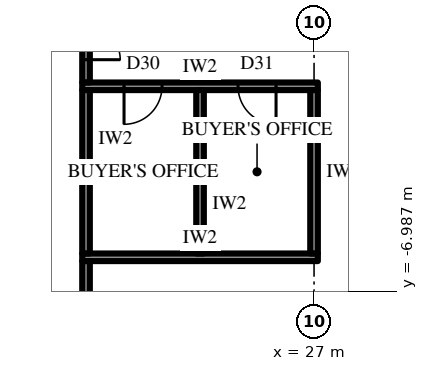
"""IFC4 building model, lengths in metres.
Left out: names, types, materials, properties, quantities, classifications, styles, units other than length and angle.
Written with IfcOpenShell. Run it as: python <this file> out.ifc"""

import sys

from ifc_helpers import new_model, si_unit, direction, frame, frame_2d, origin, place, context, subcontext, project, spatial, rectangle, extrude, element, fill, save


model = new_model("IFC4")
c1 = context("Model", 3, precision=1e-05, world=origin(), true_north=direction((0.0, 1.0)))
c2 = subcontext(c1, "Body", "Model", "MODEL_VIEW")
j1 = project(units=[si_unit("LENGTHUNIT", "METRE"), si_unit("PLANEANGLEUNIT", "RADIAN")], contexts=[c1])
p1 = place(None, origin())
s1 = spatial("IfcSite", under=j1, at=p1, CompositionType="ELEMENT")
p2 = place(p1, origin())
s2 = spatial("IfcBuilding", under=s1, at=p2, CompositionType="ELEMENT")
p3 = place(p2, frame((0.0, 0.0, 65.5)))
s3 = spatial("IfcBuildingStorey", under=s2, at=p3, CompositionType="ELEMENT", Elevation=65.5)
p4 = place(p3, frame((21.232, -30.925, 0.0), z_axis=(0.0, 0.0, 1.0), x_axis=(0.499999163675, 0.866025886636, 0.0)))
e1 = element("IfcWall", 1, at=p4, inside=s3, PredefinedType="SOLIDWALL", context=c2, shape_type="SweptSolid", body=[
    extrude(rectangle(XDim=32.332, YDim=0.3, at=frame_2d((16.166, 0.0))), origin(), (0.0, 0.0, 1.0), 2.7),
])
p5 = place(p4, frame((1.319, 0.0, 0.6)))
e2 = element("IfcOpeningElement", 2, at=p5, cuts=e1, PredefinedType="OPENING", context=c2, shape_type="SweptSolid", body=[
    extrude(rectangle(XDim=2.75, YDim=1.85, at=frame_2d((1.375, 0.925))), frame((0.0, 0.16, 0.0), z_axis=(0.0, -1.0, 0.0), x_axis=(1.0, 0.0, 0.0)), (0.0, 0.0, 1.0), 0.32),
])
p6 = place(p4, frame((6.708, 0.0, 0.6)))
e3 = element("IfcOpeningElement", 3, at=p6, cuts=e1, PredefinedType="OPENING", context=c2, shape_type="SweptSolid", body=[
    extrude(rectangle(XDim=2.75, YDim=1.85, at=frame_2d((1.375, 0.925))), frame((0.0, 0.16, 0.0), z_axis=(0.0, -1.0, 0.0), x_axis=(1.0, 0.0, 0.0)), (0.0, 0.0, 1.0), 0.32),
])
p7 = place(p4, frame((12.872, 0.0, 0.0)))
e4 = element("IfcOpeningElement", 4, at=p7, cuts=e1, PredefinedType="OPENING", context=c2, shape_type="SweptSolid", body=[
    extrude(rectangle(XDim=1.2, YDim=2.4, at=frame_2d((0.6, 1.2))), frame((0.0, 0.16, 0.0), z_axis=(0.0, -1.0, 0.0), x_axis=(1.0, 0.0, 0.0)), (0.0, 0.0, 1.0), 0.32),
])
p8 = place(p4, frame((17.485, 0.0, 0.6)))
e5 = element("IfcOpeningElement", 5, at=p8, cuts=e1, PredefinedType="OPENING", context=c2, shape_type="SweptSolid", body=[
    extrude(rectangle(XDim=2.75, YDim=1.85, at=frame_2d((1.375, 0.925))), frame((0.0, 0.16, 0.0), z_axis=(0.0, -1.0, 0.0), x_axis=(1.0, 0.0, 0.0)), (0.0, 0.0, 1.0), 0.32),
])
p9 = place(p4, frame((22.874, 0.0, 0.6)))
e6 = element("IfcOpeningElement", 6, at=p9, cuts=e1, PredefinedType="OPENING", context=c2, shape_type="SweptSolid", body=[
    extrude(rectangle(XDim=2.75, YDim=1.85, at=frame_2d((1.375, 0.925))), frame((0.0, 0.16, 0.0), z_axis=(0.0, -1.0, 0.0), x_axis=(1.0, 0.0, 0.0)), (0.0, 0.0, 1.0), 0.32),
])
p10 = place(p4, frame((28.262, 0.0, 0.6)))
e7 = element("IfcOpeningElement", 7, at=p10, cuts=e1, PredefinedType="OPENING", context=c2, shape_type="SweptSolid", body=[
    extrude(rectangle(XDim=2.75, YDim=1.85, at=frame_2d((1.375, 0.925))), frame((0.0, 0.16, 0.0), z_axis=(0.0, -1.0, 0.0), x_axis=(1.0, 0.0, 0.0)), (0.0, 0.0, 1.0), 0.32),
])
p11 = place(p3, frame((20.9, -1.6, 0.0), z_axis=(0.0, 0.0, 1.0), x_axis=(1.0, 0.0, 0.0)))
e8 = element("IfcWall", 8, at=p11, inside=s3, PredefinedType="PARTITIONING", context=c2, shape_type="SweptSolid", body=[
    extrude(rectangle(XDim=6.2, YDim=0.2, at=frame_2d((3.1, 0.0))), origin(), (0.0, 0.0, 1.0), 4.0),
])
p12 = place(p11, frame((1.1, 0.0, 0.0)))
e9 = element("IfcOpeningElement", 9, at=p12, cuts=e8, PredefinedType="OPENING", context=c2, shape_type="SweptSolid", body=[
    extrude(rectangle(XDim=1.0, YDim=2.2, at=frame_2d((0.5, 1.1))), frame((0.0, 0.11, 0.0), z_axis=(0.0, -1.0, 0.0), x_axis=(1.0, 0.0, 0.0)), (0.0, 0.0, 1.0), 0.22),
])
p13 = place(p11, frame((4.1, 0.0, 0.0)))
e10 = element("IfcOpeningElement", 10, at=p13, cuts=e8, PredefinedType="OPENING", context=c2, shape_type="SweptSolid", body=[
    extrude(rectangle(XDim=1.0, YDim=2.2, at=frame_2d((0.5, 1.1))), frame((0.0, 0.11, 0.0), z_axis=(0.0, -1.0, 0.0), x_axis=(1.0, 0.0, 0.0)), (0.0, 0.0, 1.0), 0.22),
])
p14 = place(p3, frame((20.9, -6.1, 0.0), z_axis=(0.0, 0.0, 1.0), x_axis=(1.0, 0.0, 0.0)))
e11 = element("IfcWall", 11, at=p14, inside=s3, PredefinedType="PARTITIONING", context=c2, shape_type="SweptSolid", body=[
    extrude(rectangle(XDim=6.2, YDim=0.2, at=frame_2d((3.1, 0.0))), origin(), (0.0, 0.0, 1.0), 4.0),
])
for number, where, z_axis, x_axis in (
    (12, (21.0, -1.7, 0.0), (0.0, 0.0, 1.0), (0.0, -1.0, 0.0)),
    (13, (24.0, -1.7, 0.0), (0.0, 0.0, 1.0), (0.0, -1.0, 0.0)),
    (14, (27.0, -1.7, 0.0), (0.0, 0.0, 1.0), (0.0, -1.0, 0.0)),
):
    element("IfcWall", number, at=place(p3, frame(where, z_axis=z_axis, x_axis=x_axis)), inside=s3, PredefinedType="PARTITIONING", context=c2, shape_type="SweptSolid", body=[
        extrude(rectangle(XDim=4.3, YDim=0.2, at=frame_2d((2.15, 0.0))), origin(), (0.0, 0.0, 1.0), 4.0),
    ])
p15 = place(p3, frame((21.0, -6.201, 0.0), z_axis=(0.0, 0.0, 1.0), x_axis=(0.0, -1.0, 0.0)))
e15 = element("IfcWall", 15, at=p15, inside=s3, PredefinedType="PARTITIONING", context=c2, shape_type="SweptSolid", body=[
    extrude(rectangle(XDim=6.499, YDim=0.2, at=frame_2d((3.25, 0.0))), origin(), (0.0, 0.0, 1.0), 4.0),
])
p16 = place(p3, frame((21.0, 1.499, 0.0), z_axis=(0.0, 0.0, 1.0), x_axis=(0.0, -1.0, 0.0)))
e16 = element("IfcWall", 16, at=p16, inside=s3, PredefinedType="PARTITIONING", context=c2, shape_type="SweptSolid", body=[
    extrude(rectangle(XDim=2.998, YDim=0.2, at=frame_2d((1.499, 0.0))), origin(), (0.0, 0.0, 1.0), 4.0),
])
p17 = place(p16, frame((0.599, 0.0, 0.0)))
e17 = element("IfcOpeningElement", 17, at=p17, cuts=e16, PredefinedType="OPENING", context=c2, shape_type="SweptSolid", body=[
    extrude(rectangle(XDim=1.8, YDim=2.4, at=frame_2d((0.9, 1.2))), frame((0.0, 0.11, 0.0), z_axis=(0.0, -1.0, 0.0), x_axis=(1.0, 0.0, 0.0)), (0.0, 0.0, 1.0), 0.22),
])
p18 = place(p12, frame((1.0, 0.0, 0.0), z_axis=(0.0, 0.0, 1.0), x_axis=(-1.0, 0.0, 0.0)))
e18 = element("IfcDoor", 18, at=p18, inside=s3, OperationType="SINGLE_SWING_LEFT", PredefinedType="DOOR", context=c2, shape_type="SweptSolid", body=[
    extrude(rectangle(XDim=1.0, YDim=2.2, at=frame_2d((0.5, 1.1))), frame((0.0, 0.025, 0.0), z_axis=(0.0, -1.0, 0.0), x_axis=(1.0, 0.0, 0.0)), (0.0, 0.0, 1.0), 0.05),
])
fill(e9, e18)
p19 = place(p13, frame((1.0, 0.0, 0.0), z_axis=(0.0, 0.0, 1.0), x_axis=(-1.0, 0.0, 0.0)))
e19 = element("IfcDoor", 19, at=p19, inside=s3, OperationType="SINGLE_SWING_RIGHT", PredefinedType="DOOR", context=c2, shape_type="SweptSolid", body=[
    extrude(rectangle(XDim=1.0, YDim=2.2, at=frame_2d((0.5, 1.1))), frame((0.0, 0.025, 0.0), z_axis=(0.0, -1.0, 0.0), x_axis=(1.0, 0.0, 0.0)), (0.0, 0.0, 1.0), 0.05),
])
fill(e10, e19)
p20 = place(p17, origin())
e20 = element("IfcDoor", 20, at=p20, inside=s3, OperationType="DOUBLE_DOOR_SINGLE_SWING", PredefinedType="DOOR", context=c2, shape_type="SweptSolid", body=[
    extrude(rectangle(XDim=1.8, YDim=2.4, at=frame_2d((0.9, 1.2))), frame((0.0, 0.025, 0.0), z_axis=(0.0, -1.0, 0.0), x_axis=(1.0, 0.0, 0.0)), (0.0, 0.0, 1.0), 0.05),
])
fill(e17, e20)
save(model, sys.argv[1])
